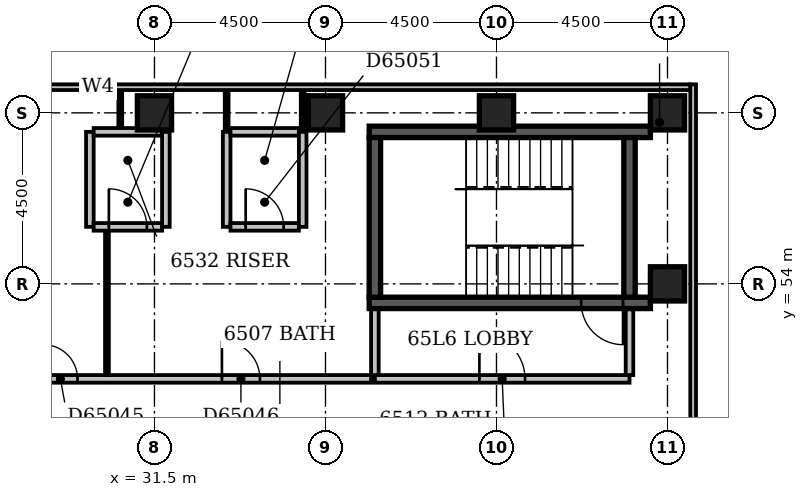
"""IFC4 building model, lengths in metres.
Left out: names, types, materials, properties, quantities, classifications, styles, units other than length and angle.
Written with IfcOpenShell. Run it as: python <this file> out.ifc"""

import sys

from ifc_helpers import new_model, si_unit, direction, frame, frame_2d, origin, origin_2d, place, context, subcontext, project, spatial, rectangle, extrude, element, fill, save


model = new_model("IFC4")
c1 = context("Model", 3, precision=1e-05, world=origin(), true_north=direction((0.0, 1.0)))
c2 = subcontext(c1, "Body", "Model", "MODEL_VIEW")
j1 = project(units=[si_unit("LENGTHUNIT", "METRE"), si_unit("PLANEANGLEUNIT", "RADIAN")], contexts=[c1])
p1 = place(None, origin())
s1 = spatial("IfcSite", under=j1, at=p1, CompositionType="ELEMENT")
p2 = place(p1, origin())
s2 = spatial("IfcBuilding", under=s1, at=p2, CompositionType="ELEMENT")
p3 = place(p2, frame((0.0, 0.0, 251.0)))
s3 = spatial("IfcBuildingStorey", under=s2, at=p3, CompositionType="ELEMENT", Elevation=251.0)
p4 = place(p3, frame((37.15, 53.5, -0.3), z_axis=(0.0, 0.0, 1.0), x_axis=(1.0, 0.0, 0.0)))
e1 = element("IfcWall", 1, at=p4, inside=s3, PredefinedType="SHEAR", context=c2, shape_type="SweptSolid", body=[
    extrude(rectangle(XDim=7.4, YDim=0.3, at=frame_2d((3.7, 0.0))), origin(), (0.0, 0.0, 1.0), 3.6),
])
p5 = place(p4, frame((5.58, 0.0, 0.3)))
e2 = element("IfcOpeningElement", 2, at=p5, cuts=e1, PredefinedType="OPENING", context=c2, shape_type="SweptSolid", body=[
    extrude(rectangle(XDim=1.1, YDim=2.1, at=frame_2d((0.55, 1.05))), frame((0.0, 0.162, 0.0), z_axis=(0.0, -1.0, 0.0), x_axis=(1.0, 0.0, 0.0)), (0.0, 0.0, 1.0), 0.324),
])
p6 = place(p3, frame((37.15, 58.0, -0.3), z_axis=(0.0, 0.0, 1.0), x_axis=(1.0, 0.0, 0.0)))
e3 = element("IfcWall", 3, at=p6, inside=s3, PredefinedType="SHEAR", context=c2, shape_type="SweptSolid", body=[
    extrude(rectangle(XDim=7.4, YDim=0.3, at=frame_2d((3.7, 0.0))), origin(), (0.0, 0.0, 1.0), 3.6),
])
for number, where, z_axis, x_axis in (
    (4, (37.3, 53.65, -0.3), (0.0, 0.0, 1.0), (0.0, 1.0, 0.0)),
    (5, (44.0, 53.65, -0.3), (0.0, 0.0, 1.0), (0.0, 1.0, 0.0)),
):
    element("IfcWall", number, at=place(p3, frame(where, z_axis=z_axis, x_axis=x_axis)), inside=s3, PredefinedType="SHEAR", context=c2, shape_type="SweptSolid", body=[
        extrude(rectangle(XDim=4.2, YDim=0.3, at=frame_2d((2.1, 0.0))), origin(), (0.0, 0.0, 1.0), 3.6),
    ])
for number, where, z_axis, x_axis in (
    (6, (45.0, 54.0, -0.3), (0.0, 0.0, 1.0), (1.0, 0.0, 0.0)),
    (7, (31.5, 58.5, -0.3), (0.0, 0.0, 1.0), (1.0, 0.0, 0.0)),
    (8, (36.0, 58.5, -0.3), (0.0, 0.0, 1.0), (1.0, 0.0, 0.0)),
    (9, (40.5, 58.5, -0.3), (0.0, 0.0, 1.0), (1.0, 0.0, 0.0)),
    (10, (45.0, 58.5, -0.3), (0.0, 0.0, 1.0), (1.0, 0.0, 0.0)),
):
    element("IfcColumn", number, at=place(p3, frame(where, z_axis=z_axis, x_axis=x_axis)), inside=s3, PredefinedType="COLUMN", context=c2, shape_type="SweptSolid", body=[
        extrude(rectangle(XDim=0.9, YDim=0.9, at=origin_2d()), origin(), (0.0, 0.0, 1.0), 3.6),
    ])
p7 = place(p3, frame((45.675, 39.9, 0.0), z_axis=(0.0, 0.0, 1.0), x_axis=(0.0, 1.0, 0.0)))
e11 = element("IfcWall", 11, at=p7, inside=s3, PredefinedType="STANDARD", context=c2, shape_type="SweptSolid", body=[
    extrude(rectangle(XDim=19.35, YDim=0.15, at=frame_2d((9.675, 0.0))), origin(), (0.0, 0.0, 1.0), 2.7),
])
p8 = place(p7, frame((1.65, 0.0, 0.6)))
e12 = element("IfcOpeningElement", 12, at=p8, cuts=e11, PredefinedType="OPENING", context=c2, shape_type="SweptSolid", body=[
    extrude(rectangle(XDim=2.4, YDim=1.8, at=frame_2d((1.2, 0.9))), frame((0.0, 0.087, 0.0), z_axis=(0.0, -1.0, 0.0), x_axis=(1.0, 0.0, 0.0)), (0.0, 0.0, 1.0), 0.174),
])
p9 = place(p7, frame((6.15, 0.0, 0.6)))
e13 = element("IfcOpeningElement", 13, at=p9, cuts=e11, PredefinedType="OPENING", context=c2, shape_type="SweptSolid", body=[
    extrude(rectangle(XDim=2.4, YDim=1.8, at=frame_2d((1.2, 0.9))), frame((0.0, 0.087, 0.0), z_axis=(0.0, -1.0, 0.0), x_axis=(1.0, 0.0, 0.0)), (0.0, 0.0, 1.0), 0.174),
])
p10 = place(p3, frame((45.6, 59.175, 0.0), z_axis=(0.0, 0.0, 1.0), x_axis=(-1.0, 0.0, 0.0)))
e14 = element("IfcWall", 14, at=p10, inside=s3, PredefinedType="STANDARD", context=c2, shape_type="SweptSolid", body=[
    extrude(rectangle(XDim=46.35, YDim=0.15, at=frame_2d((23.175, 0.0))), origin(), (0.0, 0.0, 1.0), 2.7),
])
p11 = place(p10, frame((15.287, 0.0, 0.6)))
e15 = element("IfcOpeningElement", 15, at=p11, cuts=e14, PredefinedType="OPENING", context=c2, shape_type="SweptSolid", body=[
    extrude(rectangle(XDim=0.6, YDim=1.8, at=frame_2d((0.3, 0.9))), frame((0.0, 0.087, 0.0), z_axis=(0.0, -1.0, 0.0), x_axis=(1.0, 0.0, 0.0)), (0.0, 0.0, 1.0), 0.174),
])
p12 = place(p3, frame((37.3, 51.5, 0.0), z_axis=(0.0, 0.0, 1.0), x_axis=(1.0, 0.0, 0.0)))
e16 = element("IfcWall", 16, at=p12, inside=s3, PredefinedType="PARTITIONING", context=c2, shape_type="SweptSolid", body=[
    extrude(rectangle(XDim=6.7, YDim=0.2, at=frame_2d((3.35, 0.0))), origin(), (0.0, 0.0, 1.0), 3.3),
])
p13 = place(p12, frame((2.75, 0.0, 0.0)))
e17 = element("IfcOpeningElement", 17, at=p13, cuts=e16, PredefinedType="OPENING", context=c2, shape_type="SweptSolid", body=[
    extrude(rectangle(XDim=1.2, YDim=2.1, at=frame_2d((0.6, 1.05))), frame((0.0, 0.112, 0.0), z_axis=(0.0, -1.0, 0.0), x_axis=(1.0, 0.0, 0.0)), (0.0, 0.0, 1.0), 0.224),
])
for number, where, z_axis, x_axis in (
    (18, (44.0, 51.6, 0.0), (0.0, 0.0, 1.0), (0.0, 1.0, 0.0)),
    (19, (37.3, 51.6, 0.0), (0.0, 0.0, 1.0), (0.0, 1.0, 0.0)),
):
    element("IfcWall", number, at=place(p3, frame(where, z_axis=z_axis, x_axis=x_axis)), inside=s3, PredefinedType="PARTITIONING", context=c2, shape_type="SweptSolid", body=[
        extrude(rectangle(XDim=1.73, YDim=0.2, at=frame_2d((0.865, 0.0))), origin(), (0.0, 0.0, 1.0), 3.3),
    ])
p14 = place(p3, frame((27.9, 51.5, 0.0), z_axis=(0.0, 0.0, 1.0), x_axis=(1.0, 0.0, 0.0)))
e20 = element("IfcWall", 20, at=p14, inside=s3, PredefinedType="PARTITIONING", context=c2, shape_type="SweptSolid", body=[
    extrude(rectangle(XDim=9.3, YDim=0.2, at=frame_2d((4.65, 0.0))), origin(), (0.0, 0.0, 1.0), 3.3),
])
p15 = place(p14, frame((0.675, 0.0, 0.0)))
e21 = element("IfcOpeningElement", 21, at=p15, cuts=e20, PredefinedType="OPENING", context=c2, shape_type="SweptSolid", body=[
    extrude(rectangle(XDim=0.9, YDim=2.1, at=frame_2d((0.45, 1.05))), frame((0.0, 0.112, 0.0), z_axis=(0.0, -1.0, 0.0), x_axis=(1.0, 0.0, 0.0)), (0.0, 0.0, 1.0), 0.224),
])
p16 = place(p14, frame((5.375, 0.0, 0.0)))
e22 = element("IfcOpeningElement", 22, at=p16, cuts=e20, PredefinedType="OPENING", context=c2, shape_type="SweptSolid", body=[
    extrude(rectangle(XDim=1.0, YDim=2.1, at=frame_2d((0.5, 1.05))), frame((0.0, 0.112, 0.0), z_axis=(0.0, -1.0, 0.0), x_axis=(1.0, 0.0, 0.0)), (0.0, 0.0, 1.0), 0.224),
])
p17 = place(p3, frame((30.25, 51.6, 0.0), z_axis=(0.0, 0.0, 1.0), x_axis=(0.0, 1.0, 0.0)))
e23 = element("IfcWall", 23, at=p17, inside=s3, PredefinedType="PARTITIONING", context=c2, shape_type="SweptSolid", body=[
    extrude(rectangle(XDim=3.8, YDim=0.1, at=frame_2d((1.9, 0.0))), origin(), (0.0, 0.0, 1.0), 3.3),
])
p18 = place(p3, frame((29.8, 55.5, 0.0), z_axis=(0.0, 0.0, 1.0), x_axis=(0.0, 1.0, 0.0)))
e24 = element("IfcWall", 24, at=p18, inside=s3, PredefinedType="PARTITIONING", context=c2, shape_type="SweptSolid", body=[
    extrude(rectangle(XDim=2.5, YDim=0.2, at=frame_2d((1.25, 0.0))), origin(), (0.0, 0.0, 1.0), 3.3),
])
p19 = place(p3, frame((29.9, 55.5, 0.0), z_axis=(0.0, 0.0, 1.0), x_axis=(1.0, 0.0, 0.0)))
e25 = element("IfcWall", 25, at=p19, inside=s3, PredefinedType="PARTITIONING", context=c2, shape_type="SweptSolid", body=[
    extrude(rectangle(XDim=1.8, YDim=0.2, at=frame_2d((0.9, 0.0))), origin(), (0.0, 0.0, 1.0), 3.3),
])
p20 = place(p19, frame((0.4, 0.0, 0.0)))
e26 = element("IfcOpeningElement", 26, at=p20, cuts=e25, PredefinedType="OPENING", context=c2, shape_type="SweptSolid", body=[
    extrude(rectangle(XDim=1.0, YDim=2.1, at=frame_2d((0.5, 1.05))), frame((0.0, 0.112, 0.0), z_axis=(0.0, -1.0, 0.0), x_axis=(1.0, 0.0, 0.0)), (0.0, 0.0, 1.0), 0.224),
])
for number, where, z_axis, x_axis in (
    (27, (31.8, 55.5, 0.0), (0.0, 0.0, 1.0), (0.0, 1.0, 0.0)),
    (28, (33.4, 55.5, 0.0), (0.0, 0.0, 1.0), (0.0, 1.0, 0.0)),
):
    element("IfcWall", number, at=place(p3, frame(where, z_axis=z_axis, x_axis=x_axis)), inside=s3, PredefinedType="PARTITIONING", context=c2, shape_type="SweptSolid", body=[
        extrude(rectangle(XDim=2.5, YDim=0.2, at=frame_2d((1.25, 0.0))), origin(), (0.0, 0.0, 1.0), 3.3),
    ])
p21 = place(p3, frame((33.5, 55.5, 0.0), z_axis=(0.0, 0.0, 1.0), x_axis=(1.0, 0.0, 0.0)))
e29 = element("IfcWall", 29, at=p21, inside=s3, PredefinedType="PARTITIONING", context=c2, shape_type="SweptSolid", body=[
    extrude(rectangle(XDim=1.8, YDim=0.2, at=frame_2d((0.9, 0.0))), origin(), (0.0, 0.0, 1.0), 3.3),
])
p22 = place(p21, frame((0.4, 0.0, 0.0)))
e30 = element("IfcOpeningElement", 30, at=p22, cuts=e29, PredefinedType="OPENING", context=c2, shape_type="SweptSolid", body=[
    extrude(rectangle(XDim=1.0, YDim=2.1, at=frame_2d((0.5, 1.05))), frame((0.0, 0.112, 0.0), z_axis=(0.0, -1.0, 0.0), x_axis=(1.0, 0.0, 0.0)), (0.0, 0.0, 1.0), 0.224),
])
p23 = place(p3, frame((35.4, 55.5, 0.0), z_axis=(0.0, 0.0, 1.0), x_axis=(0.0, 1.0, 0.0)))
e31 = element("IfcWall", 31, at=p23, inside=s3, PredefinedType="PARTITIONING", context=c2, shape_type="SweptSolid", body=[
    extrude(rectangle(XDim=2.5, YDim=0.2, at=frame_2d((1.25, 0.0))), origin(), (0.0, 0.0, 1.0), 3.3),
])
p24 = place(p3, frame((29.9, 58.0, 0.0), z_axis=(0.0, 0.0, 1.0), x_axis=(1.0, 0.0, 0.0)))
e32 = element("IfcWall", 32, at=p24, inside=s3, PredefinedType="PARTITIONING", context=c2, shape_type="SweptSolid", body=[
    extrude(rectangle(XDim=1.8, YDim=0.2, at=frame_2d((0.9, 0.0))), origin(), (0.0, 0.0, 1.0), 3.3),
])
p25 = place(p3, frame((33.4, 58.0, 0.0), z_axis=(0.0, 0.0, 1.0), x_axis=(0.0, 1.0, 0.0)))
e33 = element("IfcWall", 33, at=p25, inside=s3, PredefinedType="PARTITIONING", context=c2, shape_type="SweptSolid", body=[
    extrude(rectangle(XDim=1.1, YDim=0.1, at=frame_2d((0.55, 0.0))), origin(), (0.0, 0.0, 1.0), 3.3),
])
p26 = place(p3, frame((33.5, 58.0, 0.0), z_axis=(0.0, 0.0, 1.0), x_axis=(1.0, 0.0, 0.0)))
e34 = element("IfcWall", 34, at=p26, inside=s3, PredefinedType="PARTITIONING", context=c2, shape_type="SweptSolid", body=[
    extrude(rectangle(XDim=1.8, YDim=0.2, at=frame_2d((0.9, 0.0))), origin(), (0.0, 0.0, 1.0), 3.3),
])
p27 = place(p3, frame((35.4, 58.0, 0.0), z_axis=(0.0, 0.0, 1.0), x_axis=(0.0, 1.0, 0.0)))
e35 = element("IfcWall", 35, at=p27, inside=s3, PredefinedType="PARTITIONING", context=c2, shape_type="SweptSolid", body=[
    extrude(rectangle(XDim=1.1, YDim=0.1, at=frame_2d((0.55, 0.0))), origin(), (0.0, 0.0, 1.0), 3.3),
])
p28 = place(p3, frame((30.6, 58.1, 0.0), z_axis=(0.0, 0.0, 1.0), x_axis=(0.0, 1.0, 0.0)))
e36 = element("IfcWall", 36, at=p28, inside=s3, PredefinedType="PARTITIONING", context=c2, shape_type="SweptSolid", body=[
    extrude(rectangle(XDim=1.0, YDim=0.1, at=frame_2d((0.5, 0.0))), origin(), (0.0, 0.0, 1.0), 3.3),
])
p29 = place(p11, origin())
e37 = element("IfcWindow", 37, at=p29, inside=s3, PartitioningType="SINGLE_PANEL", PredefinedType="WINDOW", context=c2, shape_type="SweptSolid", body=[
    extrude(rectangle(XDim=0.6, YDim=1.8, at=frame_2d((0.3, 0.9))), frame((0.0, 0.03, 0.0), z_axis=(0.0, -1.0, 0.0), x_axis=(1.0, 0.0, 0.0)), (0.0, 0.0, 1.0), 0.06),
])
fill(e15, e37)
p30 = place(p13, origin())
e38 = element("IfcDoor", 38, at=p30, inside=s3, OperationType="SINGLE_SWING_LEFT", PredefinedType="DOOR", context=c2, shape_type="SweptSolid", body=[
    extrude(rectangle(XDim=1.2, YDim=2.1, at=frame_2d((0.6, 1.05))), frame((0.0, 0.025, 0.0), z_axis=(0.0, -1.0, 0.0), x_axis=(1.0, 0.0, 0.0)), (0.0, 0.0, 1.0), 0.05),
])
fill(e17, e38)
p31 = place(p5, origin())
e39 = element("IfcDoor", 39, at=p31, inside=s3, OperationType="SINGLE_SWING_RIGHT", PredefinedType="DOOR", context=c2, shape_type="SweptSolid", body=[
    extrude(rectangle(XDim=1.1, YDim=2.1, at=frame_2d((0.55, 1.05))), frame((0.0, 0.025, 0.0), z_axis=(0.0, -1.0, 0.0), x_axis=(1.0, 0.0, 0.0)), (0.0, 0.0, 1.0), 0.05),
])
fill(e2, e39)
p32 = place(p15, origin())
e40 = element("IfcDoor", 40, at=p32, inside=s3, OperationType="SINGLE_SWING_LEFT", PredefinedType="DOOR", context=c2, shape_type="SweptSolid", body=[
    extrude(rectangle(XDim=0.9, YDim=2.1, at=frame_2d((0.45, 1.05))), frame((0.0, 0.025, 0.0), z_axis=(0.0, -1.0, 0.0), x_axis=(1.0, 0.0, 0.0)), (0.0, 0.0, 1.0), 0.05),
])
fill(e21, e40)
p33 = place(p16, origin())
e41 = element("IfcDoor", 41, at=p33, inside=s3, OperationType="SINGLE_SWING_LEFT", PredefinedType="DOOR", context=c2, shape_type="SweptSolid", body=[
    extrude(rectangle(XDim=1.0, YDim=2.1, at=frame_2d((0.5, 1.05))), frame((0.0, 0.025, 0.0), z_axis=(0.0, -1.0, 0.0), x_axis=(1.0, 0.0, 0.0)), (0.0, 0.0, 1.0), 0.05),
])
fill(e22, e41)
p34 = place(p20, origin())
e42 = element("IfcDoor", 42, at=p34, inside=s3, OperationType="SINGLE_SWING_LEFT", PredefinedType="DOOR", context=c2, shape_type="SweptSolid", body=[
    extrude(rectangle(XDim=1.0, YDim=2.1, at=frame_2d((0.5, 1.05))), frame((0.0, 0.025, 0.0), z_axis=(0.0, -1.0, 0.0), x_axis=(1.0, 0.0, 0.0)), (0.0, 0.0, 1.0), 0.05),
])
fill(e26, e42)
p35 = place(p22, origin())
e43 = element("IfcDoor", 43, at=p35, inside=s3, OperationType="SINGLE_SWING_LEFT", PredefinedType="DOOR", context=c2, shape_type="SweptSolid", body=[
    extrude(rectangle(XDim=1.0, YDim=2.1, at=frame_2d((0.5, 1.05))), frame((0.0, 0.025, 0.0), z_axis=(0.0, -1.0, 0.0), x_axis=(1.0, 0.0, 0.0)), (0.0, 0.0, 1.0), 0.05),
])
fill(e30, e43)
save(model, sys.argv[1])
